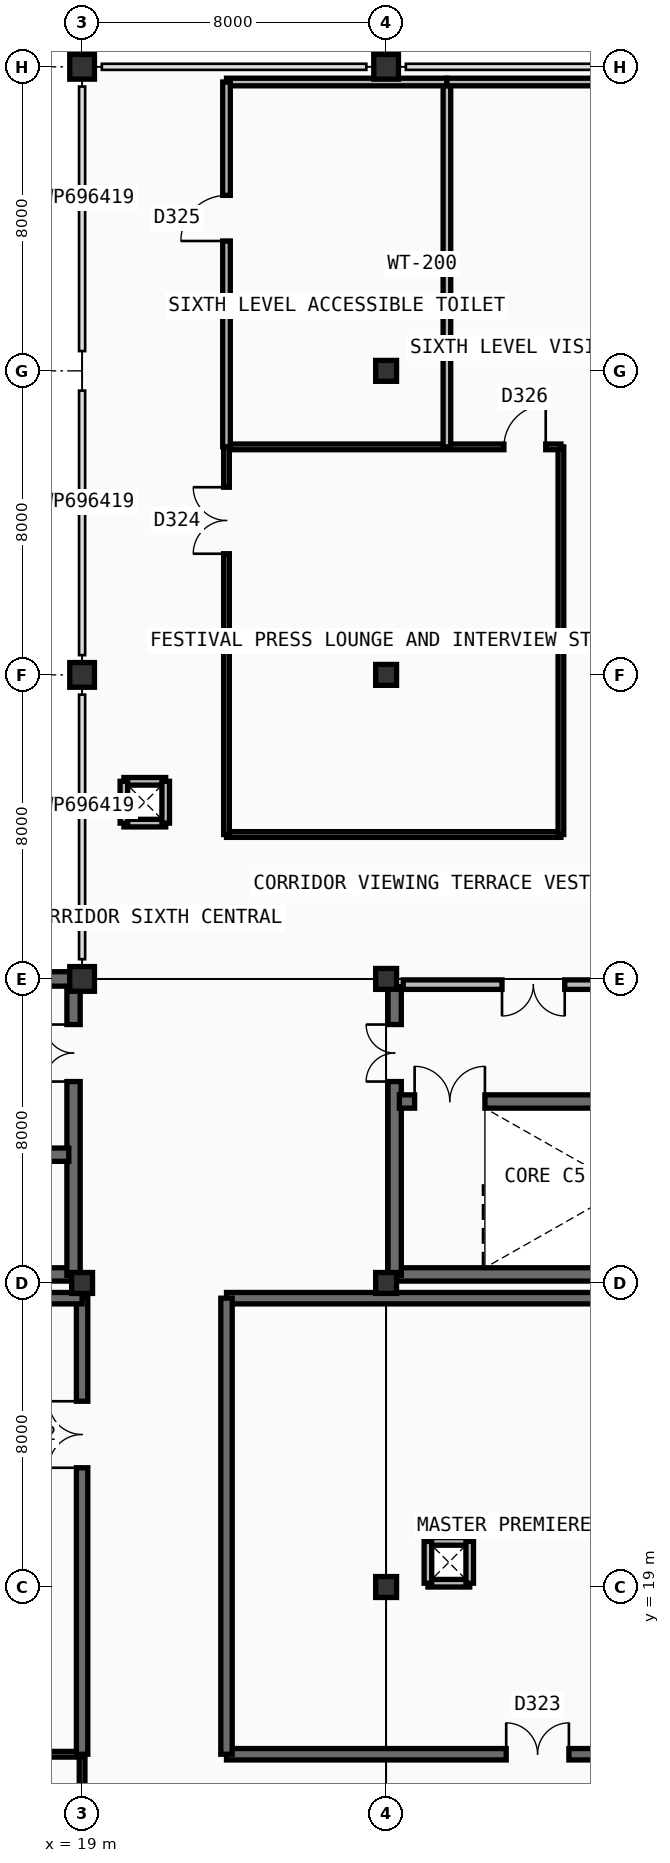
"""IFC4 building model, lengths in metres.
Left out: names, types, materials, properties, quantities, classifications, styles, units other than length and angle.
Written with IfcOpenShell. Run it as: python <this file> out.ifc"""

import sys

from ifc_helpers import new_model, si_unit, direction, frame, frame_2d, origin, origin_2d, place, context, subcontext, project, spatial, rectangle, extrude, element, fill, save


model = new_model("IFC4")
c1 = context("Model", 3, precision=1e-05, world=origin(), true_north=direction((0.0, 1.0)))
c2 = subcontext(c1, "Body", "Model", "MODEL_VIEW")
j1 = project(units=[si_unit("LENGTHUNIT", "METRE"), si_unit("PLANEANGLEUNIT", "RADIAN")], contexts=[c1])
p1 = place(None, origin())
s1 = spatial("IfcSite", under=j1, at=p1, CompositionType="ELEMENT")
p2 = place(p1, origin())
s2 = spatial("IfcBuilding", under=s1, at=p2, CompositionType="ELEMENT")
p3 = place(p2, frame((0.0, 0.0, 27.9)))
s3 = spatial("IfcBuildingStorey", under=s2, at=p3, CompositionType="ELEMENT", Elevation=27.9)
p4 = place(p3, frame((19.0, 27.0, 0.0), z_axis=(0.0, 0.0, 1.0), x_axis=(1.0, 0.0, 0.0)))
e1 = element("IfcColumn", 1, at=p4, inside=s3, PredefinedType="COLUMN", context=c2, shape_type="SweptSolid", body=[
    extrude(rectangle(XDim=0.55, YDim=0.55, at=origin_2d()), origin(), (0.0, 0.0, 1.0), 4.8),
])
for number, where, z_axis, x_axis in (
    (2, (19.0, 35.0, 0.0), (0.0, 0.0, 1.0), (1.0, 0.0, 0.0)),
    (3, (19.0, 43.0, 0.0), (0.0, 0.0, 1.0), (1.0, 0.0, 0.0)),
    (4, (19.0, 59.0, 0.0), (0.0, 0.0, 1.0), (1.0, 0.0, 0.0)),
):
    element("IfcColumn", number, at=place(p3, frame(where, z_axis=z_axis, x_axis=x_axis)), inside=s3, PredefinedType="COLUMN", context=c2, shape_type="SweptSolid", body=[
        extrude(rectangle(XDim=0.65, YDim=0.65, at=origin_2d()), origin(), (0.0, 0.0, 1.0), 4.8),
    ])
for number, where, z_axis, x_axis in (
    (5, (27.0, 19.0, 0.0), (0.0, 0.0, 1.0), (1.0, 0.0, 0.0)),
    (6, (27.0, 27.0, 0.0), (0.0, 0.0, 1.0), (1.0, 0.0, 0.0)),
    (7, (27.0, 35.0, 0.0), (0.0, 0.0, 1.0), (1.0, 0.0, 0.0)),
    (8, (27.0, 43.0, 0.0), (0.0, 0.0, 1.0), (1.0, 0.0, 0.0)),
    (9, (27.0, 51.0, 0.0), (0.0, 0.0, 1.0), (1.0, 0.0, 0.0)),
):
    element("IfcColumn", number, at=place(p3, frame(where, z_axis=z_axis, x_axis=x_axis)), inside=s3, PredefinedType="COLUMN", context=c2, shape_type="SweptSolid", body=[
        extrude(rectangle(XDim=0.55, YDim=0.55, at=origin_2d()), origin(), (0.0, 0.0, 1.0), 4.8),
    ])
p5 = place(p3, frame((27.0, 59.0, 0.0), z_axis=(0.0, 0.0, 1.0), x_axis=(1.0, 0.0, 0.0)))
e10 = element("IfcColumn", 10, at=p5, inside=s3, PredefinedType="COLUMN", context=c2, shape_type="SweptSolid", body=[
    extrude(rectangle(XDim=0.65, YDim=0.65, at=origin_2d()), origin(), (0.0, 0.0, 1.0), 4.8),
])
p6 = place(p3, frame((11.0, 35.0, 0.0), z_axis=(0.0, 0.0, 1.0), x_axis=(1.0, 0.0, 0.0)))
e11 = element("IfcWall", 11, at=p6, inside=s3, PredefinedType="SOLIDWALL", context=c2, shape_type="SweptSolid", body=[
    extrude(rectangle(XDim=8.0, YDim=0.38, at=frame_2d((4.0, 0.0))), origin(), (0.0, 0.0, 1.0), 4.8),
])
p7 = place(p3, frame((3.2, 27.225, 0.0), z_axis=(0.0, 0.0, 1.0), x_axis=(1.0, 0.0, 0.0)))
e12 = element("IfcWall", 12, at=p7, inside=s3, PredefinedType="SHEAR", context=c2, shape_type="SweptSolid", body=[
    extrude(rectangle(XDim=15.6, YDim=0.35, at=frame_2d((7.8, 0.0))), origin(), (0.0, 0.0, 1.0), 4.54),
])
p8 = place(p3, frame((18.775, 27.2, 0.0), z_axis=(0.0, 0.0, 1.0), x_axis=(0.0, 1.0, 0.0)))
e13 = element("IfcWall", 13, at=p8, inside=s3, PredefinedType="SHEAR", context=c2, shape_type="SweptSolid", body=[
    extrude(rectangle(XDim=7.6, YDim=0.35, at=frame_2d((3.8, 0.0))), origin(), (0.0, 0.0, 1.0), 4.54),
])
p9 = place(p8, frame((5.1, 0.0, 0.0)))
e14 = element("IfcOpeningElement", 14, at=p9, cuts=e13, PredefinedType="OPENING", context=c2, shape_type="SweptSolid", body=[
    extrude(rectangle(XDim=1.5, YDim=2.2, at=frame_2d((0.75, 1.1))), frame((0.0, 0.185, 0.0), z_axis=(0.0, -1.0, 0.0), x_axis=(1.0, 0.0, 0.0)), (0.0, 0.0, 1.0), 0.37),
])
p10 = place(p3, frame((13.175, 30.375, 0.0), z_axis=(0.0, 0.0, 1.0), x_axis=(1.0, 0.0, 0.0)))
e15 = element("IfcWall", 15, at=p10, inside=s3, PredefinedType="SHEAR", context=c2, shape_type="SweptSolid", body=[
    extrude(rectangle(XDim=5.475, YDim=0.35, at=frame_2d((2.737, 0.0))), origin(), (0.0, 0.0, 1.0), 4.54),
])
p11 = place(p10, frame((0.7, 0.0, 0.0)))
e16 = element("IfcOpeningElement", 16, at=p11, cuts=e15, PredefinedType="OPENING", context=c2, shape_type="SweptSolid", body=[
    extrude(rectangle(XDim=1.25, YDim=2.25, at=frame_2d((0.625, 1.125))), frame((0.0, 0.185, 0.0), z_axis=(0.0, -1.0, 0.0), x_axis=(1.0, 0.0, 0.0)), (0.0, 0.0, 1.0), 0.37),
])
p12 = place(p10, frame((3.475, 0.0, 0.0)))
e17 = element("IfcOpeningElement", 17, at=p12, cuts=e15, PredefinedType="OPENING", context=c2, shape_type="SweptSolid", body=[
    extrude(rectangle(XDim=1.1, YDim=2.2, at=frame_2d((0.55, 1.1))), frame((0.0, 0.185, 0.0), z_axis=(0.0, -1.0, 0.0), x_axis=(1.0, 0.0, 0.0)), (0.0, 0.0, 1.0), 0.37),
])
p13 = place(p3, frame((27.2, 27.225, 0.0), z_axis=(0.0, 0.0, 1.0), x_axis=(1.0, 0.0, 0.0)))
e18 = element("IfcWall", 18, at=p13, inside=s3, PredefinedType="SHEAR", context=c2, shape_type="SweptSolid", body=[
    extrude(rectangle(XDim=15.6, YDim=0.35, at=frame_2d((7.8, 0.0))), origin(), (0.0, 0.0, 1.0), 4.54),
])
p14 = place(p3, frame((27.225, 27.2, 0.0), z_axis=(0.0, 0.0, 1.0), x_axis=(0.0, 1.0, 0.0)))
e19 = element("IfcWall", 19, at=p14, inside=s3, PredefinedType="SHEAR", context=c2, shape_type="SweptSolid", body=[
    extrude(rectangle(XDim=7.6, YDim=0.35, at=frame_2d((3.8, 0.0))), origin(), (0.0, 0.0, 1.0), 4.54),
])
p15 = place(p14, frame((5.1, 0.0, 0.0)))
e20 = element("IfcOpeningElement", 20, at=p15, cuts=e19, PredefinedType="OPENING", context=c2, shape_type="SweptSolid", body=[
    extrude(rectangle(XDim=1.5, YDim=2.2, at=frame_2d((0.75, 1.1))), frame((0.0, 0.185, 0.0), z_axis=(0.0, -1.0, 0.0), x_axis=(1.0, 0.0, 0.0)), (0.0, 0.0, 1.0), 0.37),
])
p16 = place(p3, frame((27.35, 31.775, 0.0), z_axis=(0.0, 0.0, 1.0), x_axis=(1.0, 0.0, 0.0)))
e21 = element("IfcWall", 21, at=p16, inside=s3, PredefinedType="SHEAR", context=c2, shape_type="SweptSolid", body=[
    extrude(rectangle(XDim=9.825, YDim=0.35, at=frame_2d((4.913, 0.0))), origin(), (0.0, 0.0, 1.0), 4.54),
])
p17 = place(p16, frame((0.4, 0.0, 0.0)))
e22 = element("IfcOpeningElement", 22, at=p17, cuts=e21, PredefinedType="OPENING", context=c2, shape_type="SweptSolid", body=[
    extrude(rectangle(XDim=1.85, YDim=2.25, at=frame_2d((0.925, 1.125))), frame((0.0, 0.185, 0.0), z_axis=(0.0, -1.0, 0.0), x_axis=(1.0, 0.0, 0.0)), (0.0, 0.0, 1.0), 0.37),
])
p18 = place(p3, frame((27.45, 34.85, 0.0), z_axis=(0.0, 0.0, 1.0), x_axis=(1.0, 0.0, 0.0)))
e23 = element("IfcWall", 23, at=p18, inside=s3, PredefinedType="PARTITIONING", context=c2, shape_type="SweptSolid", body=[
    extrude(rectangle(XDim=7.1, YDim=0.25, at=frame_2d((3.55, 0.0))), origin(), (0.0, 0.0, 1.0), 4.54),
])
p19 = place(p18, frame((2.6, 0.0, 0.0)))
e24 = element("IfcOpeningElement", 24, at=p19, cuts=e23, PredefinedType="OPENING", context=c2, shape_type="SweptSolid", body=[
    extrude(rectangle(XDim=1.65, YDim=2.25, at=frame_2d((0.825, 1.125))), frame((0.0, 0.135, 0.0), z_axis=(0.0, -1.0, 0.0), x_axis=(1.0, 0.0, 0.0)), (0.0, 0.0, 1.0), 0.27),
])
p20 = place(p3, frame((19.0, 3.4, 0.0), z_axis=(0.0, 0.0, 1.0), x_axis=(0.0, 1.0, 0.0)))
e25 = element("IfcWall", 25, at=p20, inside=s3, PredefinedType="PARTITIONING", context=c2, shape_type="SweptSolid", body=[
    extrude(rectangle(XDim=11.2, YDim=0.15, at=frame_2d((5.6, 0.0))), origin(), (0.0, 0.0, 1.0), 4.54),
])
p21 = place(p20, frame((2.689, 0.0, 0.0)))
e26 = element("IfcOpeningElement", 26, at=p21, cuts=e25, PredefinedType="OPENING", context=c2, shape_type="SweptSolid", body=[
    extrude(rectangle(XDim=1.75, YDim=2.3, at=frame_2d((0.875, 1.15))), frame((0.0, 0.085, 0.0), z_axis=(0.0, -1.0, 0.0), x_axis=(1.0, 0.0, 0.0)), (0.0, 0.0, 1.0), 0.17),
])
p22 = place(p3, frame((5.4, 14.6, 0.0), z_axis=(0.0, 0.0, 1.0), x_axis=(1.0, 0.0, 0.0)))
e27 = element("IfcWall", 27, at=p22, inside=s3, PredefinedType="PARTITIONING", context=c2, shape_type="SweptSolid", body=[
    extrude(rectangle(XDim=13.6, YDim=0.15, at=frame_2d((6.8, 0.0))), origin(), (0.0, 0.0, 1.0), 4.54),
])
p23 = place(p3, frame((19.0, 14.6, 0.0), z_axis=(0.0, 0.0, 1.0), x_axis=(0.0, 1.0, 0.0)))
e28 = element("IfcWall", 28, at=p23, inside=s3, PredefinedType="SHEAR", context=c2, shape_type="SweptSolid", body=[
    extrude(rectangle(XDim=12.0, YDim=0.3, at=frame_2d((6.0, 0.0))), origin(), (0.0, 0.0, 1.0), 4.54),
])
p24 = place(p23, frame((7.538, 0.0, 0.0)))
e29 = element("IfcOpeningElement", 29, at=p24, cuts=e28, PredefinedType="OPENING", context=c2, shape_type="SweptSolid", body=[
    extrude(rectangle(XDim=1.75, YDim=2.28, at=frame_2d((0.875, 1.14))), frame((0.0, 0.16, 0.0), z_axis=(0.0, -1.0, 0.0), x_axis=(1.0, 0.0, 0.0)), (0.0, 0.0, 1.0), 0.32),
])
p25 = place(p3, frame((3.4, 26.6, 0.0), z_axis=(0.0, 0.0, 1.0), x_axis=(1.0, 0.0, 0.0)))
e30 = element("IfcWall", 30, at=p25, inside=s3, PredefinedType="SHEAR", context=c2, shape_type="SweptSolid", body=[
    extrude(rectangle(XDim=15.6, YDim=0.3, at=frame_2d((7.8, 0.0))), origin(), (0.0, 0.0, 1.0), 4.54),
])
p26 = place(p3, frame((22.8, 14.6, 0.0), z_axis=(0.0, 0.0, 1.0), x_axis=(1.0, 0.0, 0.0)))
e31 = element("IfcWall", 31, at=p26, inside=s3, PredefinedType="SHEAR", context=c2, shape_type="SweptSolid", body=[
    extrude(rectangle(XDim=19.8, YDim=0.3, at=frame_2d((9.9, 0.0))), origin(), (0.0, 0.0, 1.0), 4.54),
])
p27 = place(p26, frame((7.36, 0.0, 0.0)))
e32 = element("IfcOpeningElement", 32, at=p27, cuts=e31, PredefinedType="OPENING", context=c2, shape_type="SweptSolid", body=[
    extrude(rectangle(XDim=1.65, YDim=2.25, at=frame_2d((0.825, 1.125))), frame((0.0, 0.16, 0.0), z_axis=(0.0, -1.0, 0.0), x_axis=(1.0, 0.0, 0.0)), (0.0, 0.0, 1.0), 0.32),
])
p28 = place(p3, frame((22.8, 26.6, 0.0), z_axis=(0.0, 0.0, 1.0), x_axis=(1.0, 0.0, 0.0)))
e33 = element("IfcWall", 33, at=p28, inside=s3, PredefinedType="SHEAR", context=c2, shape_type="SweptSolid", body=[
    extrude(rectangle(XDim=19.8, YDim=0.3, at=frame_2d((9.9, 0.0))), origin(), (0.0, 0.0, 1.0), 4.54),
])
p29 = place(p3, frame((22.8, 14.6, 0.0), z_axis=(0.0, 0.0, 1.0), x_axis=(0.0, 1.0, 0.0)))
e34 = element("IfcWall", 34, at=p29, inside=s3, PredefinedType="SHEAR", context=c2, shape_type="SweptSolid", body=[
    extrude(rectangle(XDim=12.0, YDim=0.3, at=frame_2d((6.0, 0.0))), origin(), (0.0, 0.0, 1.0), 4.54),
])
p30 = place(p3, frame((22.8, 38.8, 0.0), z_axis=(0.0, 0.0, 1.0), x_axis=(1.0, 0.0, 0.0)))
e35 = element("IfcWall", 35, at=p30, inside=s3, PredefinedType="PARTITIONING", context=c2, shape_type="SweptSolid", body=[
    extrude(rectangle(XDim=8.8, YDim=0.15, at=frame_2d((4.4, 0.0))), origin(), (0.0, 0.0, 1.0), 4.54),
])
p31 = place(p3, frame((31.6, 38.8, 0.0), z_axis=(0.0, 0.0, 1.0), x_axis=(0.0, 1.0, 0.0)))
e36 = element("IfcWall", 36, at=p31, inside=s3, PredefinedType="PARTITIONING", context=c2, shape_type="SweptSolid", body=[
    extrude(rectangle(XDim=10.2, YDim=0.15, at=frame_2d((5.1, 0.0))), origin(), (0.0, 0.0, 1.0), 4.54),
])
p32 = place(p3, frame((22.8, 49.0, 0.0), z_axis=(0.0, 0.0, 1.0), x_axis=(1.0, 0.0, 0.0)))
e37 = element("IfcWall", 37, at=p32, inside=s3, PredefinedType="PARTITIONING", context=c2, shape_type="SweptSolid", body=[
    extrude(rectangle(XDim=8.8, YDim=0.15, at=frame_2d((4.4, 0.0))), origin(), (0.0, 0.0, 1.0), 4.54),
])
p33 = place(p32, frame((7.3, 0.0, 0.0)))
e38 = element("IfcOpeningElement", 38, at=p33, cuts=e37, PredefinedType="OPENING", context=c2, shape_type="SweptSolid", body=[
    extrude(rectangle(XDim=1.1, YDim=2.16, at=frame_2d((0.55, 1.08))), frame((0.0, 0.085, 0.0), z_axis=(0.0, -1.0, 0.0), x_axis=(1.0, 0.0, 0.0)), (0.0, 0.0, 1.0), 0.17),
])
p34 = place(p3, frame((22.8, 38.8, 0.0), z_axis=(0.0, 0.0, 1.0), x_axis=(0.0, 1.0, 0.0)))
e39 = element("IfcWall", 39, at=p34, inside=s3, PredefinedType="PARTITIONING", context=c2, shape_type="SweptSolid", body=[
    extrude(rectangle(XDim=10.2, YDim=0.15, at=frame_2d((5.1, 0.0))), origin(), (0.0, 0.0, 1.0), 4.54),
])
p35 = place(p34, frame((7.388, 0.0, 0.0)))
e40 = element("IfcOpeningElement", 40, at=p35, cuts=e39, PredefinedType="OPENING", context=c2, shape_type="SweptSolid", body=[
    extrude(rectangle(XDim=1.75, YDim=2.3, at=frame_2d((0.875, 1.15))), frame((0.0, 0.085, 0.0), z_axis=(0.0, -1.0, 0.0), x_axis=(1.0, 0.0, 0.0)), (0.0, 0.0, 1.0), 0.17),
])
p36 = place(p3, frame((28.6, 49.0, 0.0), z_axis=(0.0, 0.0, 1.0), x_axis=(0.0, 1.0, 0.0)))
e41 = element("IfcWall", 41, at=p36, inside=s3, PredefinedType="PARTITIONING", context=c2, shape_type="SweptSolid", body=[
    extrude(rectangle(XDim=9.6, YDim=0.2, at=frame_2d((4.8, 0.0))), origin(), (0.0, 0.0, 1.0), 4.54),
])
p37 = place(p3, frame((22.8, 58.6, 0.0), z_axis=(0.0, 0.0, 1.0), x_axis=(1.0, 0.0, 0.0)))
e42 = element("IfcWall", 42, at=p37, inside=s3, PredefinedType="PARTITIONING", context=c2, shape_type="SweptSolid", body=[
    extrude(rectangle(XDim=5.8, YDim=0.2, at=frame_2d((2.9, 0.0))), origin(), (0.0, 0.0, 1.0), 4.54),
])
p38 = place(p3, frame((22.8, 49.0, 0.0), z_axis=(0.0, 0.0, 1.0), x_axis=(0.0, 1.0, 0.0)))
e43 = element("IfcWall", 43, at=p38, inside=s3, PredefinedType="PARTITIONING", context=c2, shape_type="SweptSolid", body=[
    extrude(rectangle(XDim=9.6, YDim=0.2, at=frame_2d((4.8, 0.0))), origin(), (0.0, 0.0, 1.0), 4.54),
])
p39 = place(p38, frame((5.417, 0.0, 0.0)))
e44 = element("IfcOpeningElement", 44, at=p39, cuts=e43, PredefinedType="OPENING", context=c2, shape_type="SweptSolid", body=[
    extrude(rectangle(XDim=1.2, YDim=2.2, at=frame_2d((0.6, 1.1))), frame((0.0, 0.11, 0.0), z_axis=(0.0, -1.0, 0.0), x_axis=(1.0, 0.0, 0.0)), (0.0, 0.0, 1.0), 0.22),
])
p40 = place(p3, frame((28.6, 58.6, 0.0), z_axis=(0.0, 0.0, 1.0), x_axis=(1.0, 0.0, 0.0)))
e45 = element("IfcWall", 45, at=p40, inside=s3, PredefinedType="PARTITIONING", context=c2, shape_type="SweptSolid", body=[
    extrude(rectangle(XDim=6.0, YDim=0.2, at=frame_2d((3.0, 0.0))), origin(), (0.0, 0.0, 1.0), 4.54),
])
for number, where, z_axis, x_axis in (
    (46, (20.1, 39.1, 0.0), (0.0, 0.0, 1.0), (1.0, 0.0, 0.0)),
    (47, (20.1, 40.2, 0.0), (0.0, 0.0, 1.0), (1.0, 0.0, 0.0)),
    (48, (20.1, 39.1, 0.0), (0.0, 0.0, 1.0), (0.0, 1.0, 0.0)),
    (49, (21.2, 39.1, 0.0), (0.0, 0.0, 1.0), (0.0, 1.0, 0.0)),
    (50, (28.1, 19.1, 0.0), (0.0, 0.0, 1.0), (1.0, 0.0, 0.0)),
    (51, (28.1, 20.2, 0.0), (0.0, 0.0, 1.0), (1.0, 0.0, 0.0)),
    (52, (28.1, 19.1, 0.0), (0.0, 0.0, 1.0), (0.0, 1.0, 0.0)),
    (53, (29.2, 19.1, 0.0), (0.0, 0.0, 1.0), (0.0, 1.0, 0.0)),
):
    element("IfcWall", number, at=place(p3, frame(where, z_axis=z_axis, x_axis=x_axis)), inside=s3, PredefinedType="PARTITIONING", context=c2, shape_type="SweptSolid", body=[
        extrude(rectangle(XDim=1.1, YDim=0.2, at=frame_2d((0.55, 0.0))), origin(), (0.0, 0.0, 1.0), 4.54),
    ])
p41 = place(p9, origin())
e54 = element("IfcDoor", 54, at=p41, inside=s3, OperationType="DOUBLE_DOOR_SINGLE_SWING", PredefinedType="DOOR", context=c2, shape_type="SweptSolid", body=[
    extrude(rectangle(XDim=1.5, YDim=2.2, at=frame_2d((0.75, 1.1))), frame((0.0, 0.025, 0.0), z_axis=(0.0, -1.0, 0.0), x_axis=(1.0, 0.0, 0.0)), (0.0, 0.0, 1.0), 0.05),
])
fill(e14, e54)
p42 = place(p17, origin())
e55 = element("IfcDoor", 55, at=p42, inside=s3, OperationType="DOUBLE_DOOR_SINGLE_SWING", PredefinedType="DOOR", context=c2, shape_type="SweptSolid", body=[
    extrude(rectangle(XDim=1.85, YDim=2.25, at=frame_2d((0.925, 1.125))), frame((0.0, 0.025, 0.0), z_axis=(0.0, -1.0, 0.0), x_axis=(1.0, 0.0, 0.0)), (0.0, 0.0, 1.0), 0.05),
])
fill(e22, e55)
p43 = place(p19, frame((1.65, 0.0, 0.0), z_axis=(0.0, 0.0, 1.0), x_axis=(-1.0, 0.0, 0.0)))
e56 = element("IfcDoor", 56, at=p43, inside=s3, OperationType="DOUBLE_DOOR_SINGLE_SWING", PredefinedType="DOOR", context=c2, shape_type="SweptSolid", body=[
    extrude(rectangle(XDim=1.65, YDim=2.25, at=frame_2d((0.825, 1.125))), frame((0.0, 0.025, 0.0), z_axis=(0.0, -1.0, 0.0), x_axis=(1.0, 0.0, 0.0)), (0.0, 0.0, 1.0), 0.05),
])
fill(e24, e56)
p44 = place(p15, origin())
e57 = element("IfcDoor", 57, at=p44, inside=s3, OperationType="DOUBLE_DOOR_SINGLE_SWING", PredefinedType="DOOR", context=c2, shape_type="SweptSolid", body=[
    extrude(rectangle(XDim=1.5, YDim=2.2, at=frame_2d((0.75, 1.1))), frame((0.0, 0.025, 0.0), z_axis=(0.0, -1.0, 0.0), x_axis=(1.0, 0.0, 0.0)), (0.0, 0.0, 1.0), 0.05),
])
fill(e20, e57)
p45 = place(p24, origin())
e58 = element("IfcDoor", 58, at=p45, inside=s3, OperationType="DOUBLE_DOOR_SINGLE_SWING", PredefinedType="DOOR", context=c2, shape_type="SweptSolid", body=[
    extrude(rectangle(XDim=1.75, YDim=2.28, at=frame_2d((0.875, 1.14))), frame((0.0, 0.025, 0.0), z_axis=(0.0, -1.0, 0.0), x_axis=(1.0, 0.0, 0.0)), (0.0, 0.0, 1.0), 0.05),
])
fill(e29, e58)
p46 = place(p27, origin())
e59 = element("IfcDoor", 59, at=p46, inside=s3, OperationType="DOUBLE_DOOR_SINGLE_SWING", PredefinedType="DOOR", context=c2, shape_type="SweptSolid", body=[
    extrude(rectangle(XDim=1.65, YDim=2.25, at=frame_2d((0.825, 1.125))), frame((0.0, 0.025, 0.0), z_axis=(0.0, -1.0, 0.0), x_axis=(1.0, 0.0, 0.0)), (0.0, 0.0, 1.0), 0.05),
])
fill(e32, e59)
p47 = place(p35, origin())
e60 = element("IfcDoor", 60, at=p47, inside=s3, OperationType="DOUBLE_DOOR_SINGLE_SWING", PredefinedType="DOOR", context=c2, shape_type="SweptSolid", body=[
    extrude(rectangle(XDim=1.75, YDim=2.3, at=frame_2d((0.875, 1.15))), frame((0.0, 0.025, 0.0), z_axis=(0.0, -1.0, 0.0), x_axis=(1.0, 0.0, 0.0)), (0.0, 0.0, 1.0), 0.05),
])
fill(e40, e60)
p48 = place(p39, origin())
e61 = element("IfcDoor", 61, at=p48, inside=s3, OperationType="SINGLE_SWING_LEFT", PredefinedType="DOOR", context=c2, shape_type="SweptSolid", body=[
    extrude(rectangle(XDim=1.2, YDim=2.2, at=frame_2d((0.6, 1.1))), frame((0.0, 0.025, 0.0), z_axis=(0.0, -1.0, 0.0), x_axis=(1.0, 0.0, 0.0)), (0.0, 0.0, 1.0), 0.05),
])
fill(e44, e61)
p49 = place(p33, origin())
e62 = element("IfcDoor", 62, at=p49, inside=s3, OperationType="SINGLE_SWING_RIGHT", PredefinedType="DOOR", context=c2, shape_type="SweptSolid", body=[
    extrude(rectangle(XDim=1.1, YDim=2.16, at=frame_2d((0.55, 1.08))), frame((0.0, 0.025, 0.0), z_axis=(0.0, -1.0, 0.0), x_axis=(1.0, 0.0, 0.0)), (0.0, 0.0, 1.0), 0.05),
])
fill(e38, e62)
save(model, sys.argv[1])
